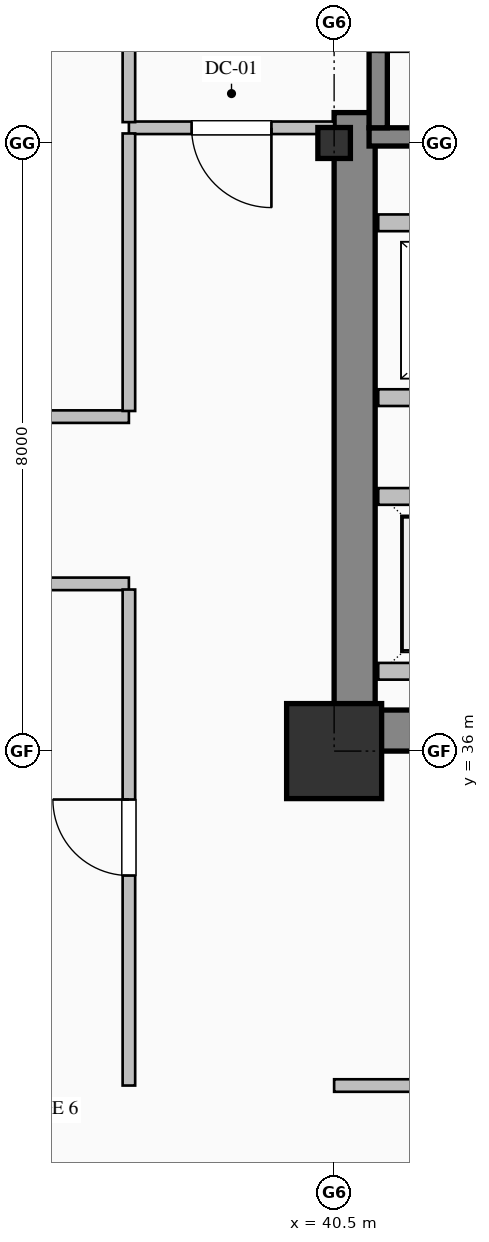
"""IFC4 building model, lengths in metres.
Left out: names, types, materials, properties, quantities, classifications, styles, units other than length and angle.
Written with IfcOpenShell. Run it as: python <this file> out.ifc"""

import sys

from ifc_helpers import new_model, si_unit, direction, frame, frame_2d, origin, origin_2d, place, context, subcontext, project, spatial, rectangle, hollow_rectangle, i_section, extrude, element, fill, save


model = new_model("IFC4")
c1 = context("Model", 3, precision=1e-05, world=origin(), true_north=direction((0.0, 1.0)))
c2 = subcontext(c1, "Body", "Model", "MODEL_VIEW")
j1 = project(units=[si_unit("LENGTHUNIT", "METRE"), si_unit("PLANEANGLEUNIT", "RADIAN")], contexts=[c1])
p1 = place(None, origin())
s1 = spatial("IfcSite", under=j1, at=p1, CompositionType="ELEMENT")
p2 = place(p1, origin())
s2 = spatial("IfcBuilding", under=s1, at=p2, CompositionType="ELEMENT")
p3 = place(p2, frame((0.0, 0.0, 96.2)))
s3 = spatial("IfcBuildingStorey", under=s2, at=p3, CompositionType="ELEMENT", Elevation=96.2)
p4 = place(p3, frame((40.77, 36.54, 0.0), z_axis=(0.0, 0.0, 1.0), x_axis=(0.0, 1.0, 0.0)))
e1 = element("IfcWall", 1, at=p4, inside=s3, PredefinedType="SHEAR", context=c2, shape_type="SweptSolid", body=[
    extrude(rectangle(XDim=7.86, YDim=0.54, at=frame_2d((3.93, 0.0))), origin(), (0.0, 0.0, 1.0), 3.75),
])
p5 = place(p3, frame((40.5, 36.27, 0.0), z_axis=(0.0, 0.0, 1.0), x_axis=(1.0, 0.0, 0.0)))
e2 = element("IfcWall", 2, at=p5, inside=s3, PredefinedType="SHEAR", context=c2, shape_type="SweptSolid", body=[
    extrude(rectangle(XDim=1.7, YDim=0.54, at=frame_2d((0.85, 0.0))), origin(), (0.0, 0.0, 1.0), 3.75),
])
p6 = place(p3, frame((40.5, 36.0, 0.0), z_axis=(0.0, 0.0, 1.0), x_axis=(1.0, 0.0, 0.0)))
e3 = element("IfcColumn", 3, at=p6, inside=s3, PredefinedType="COLUMN", context=c2, shape_type="SweptSolid", body=[
    extrude(hollow_rectangle(XDim=1.25, YDim=1.25, WallThickness=0.045, at=origin_2d()), origin(), (0.0, 0.0, 1.0), 4.0),
])
p7 = place(p3, frame((40.5, 44.0, 0.0), z_axis=(0.0, 0.0, 1.0), x_axis=(1.0, 0.0, 0.0)))
e4 = element("IfcColumn", 4, at=p7, inside=s3, PredefinedType="COLUMN", context=c2, shape_type="SweptSolid", body=[
    extrude(i_section(OverallWidth=0.407, OverallDepth=0.428, WebThickness=0.02, FlangeThickness=0.035, FilletRadius=0.022, at=origin_2d()), origin(), (0.0, 0.0, 1.0), 4.0),
])
p8 = place(p3, frame((49.04, 44.08, 0.0), z_axis=(0.0, 0.0, 1.0), x_axis=(-1.0, 0.0, 0.0)))
e5 = element("IfcWall", 5, at=p8, inside=s3, PredefinedType="SOLIDWALL", context=c2, shape_type="SweptSolid", body=[
    extrude(rectangle(XDim=8.08, YDim=0.24, at=frame_2d((4.04, 0.0))), origin(), (0.0, 0.0, 1.0), 4.0),
])
p9 = place(p3, frame((41.08, 47.35, 0.0), z_axis=(0.0, 0.0, 1.0), x_axis=(0.0, -1.0, 0.0)))
e6 = element("IfcWall", 6, at=p9, inside=s3, PredefinedType="SOLIDWALL", context=c2, shape_type="SweptSolid", body=[
    extrude(rectangle(XDim=3.15, YDim=0.24, at=frame_2d((1.575, 0.0))), origin(), (0.0, 0.0, 1.0), 4.0),
])
p10 = place(p9, frame((1.0, 0.0, 0.0)))
e7 = element("IfcOpeningElement", 7, at=p10, cuts=e6, PredefinedType="OPENING", context=c2, shape_type="SweptSolid", body=[
    extrude(rectangle(XDim=1.15, YDim=2.2, at=frame_2d((0.575, 1.1))), frame((0.0, 0.13, 0.0), z_axis=(0.0, -1.0, 0.0), x_axis=(1.0, 0.0, 0.0)), (0.0, 0.0, 1.0), 0.26),
])
p11 = place(p3, frame((49.32, 37.05, 0.0), z_axis=(0.0, 0.0, 1.0), x_axis=(-1.0, 0.0, 0.0)))
e8 = element("IfcWall", 8, at=p11, inside=s3, PredefinedType="PARTITIONING", context=c2, shape_type="SweptSolid", body=[
    extrude(rectangle(XDim=8.24, YDim=0.22, at=frame_2d((4.12, 0.0))), origin(), (0.0, 0.0, 1.0), 3.75),
])
p12 = place(p11, frame((6.37, 0.0, 0.0)))
e9 = element("IfcOpeningElement", 9, at=p12, cuts=e8, PredefinedType="OPENING", context=c2, shape_type="SweptSolid", body=[
    extrude(rectangle(XDim=1.1, YDim=2.2, at=frame_2d((0.55, 1.1))), frame((0.0, 0.12, 0.0), z_axis=(0.0, -1.0, 0.0), x_axis=(1.0, 0.0, 0.0)), (0.0, 0.0, 1.0), 0.24),
])
p13 = place(p11, frame((3.57, 0.0, 0.0)))
e10 = element("IfcOpeningElement", 10, at=p13, cuts=e8, PredefinedType="OPENING", context=c2, shape_type="SweptSolid", body=[
    extrude(rectangle(XDim=1.1, YDim=2.2, at=frame_2d((0.55, 1.1))), frame((0.0, 0.12, 0.0), z_axis=(0.0, -1.0, 0.0), x_axis=(1.0, 0.0, 0.0)), (0.0, 0.0, 1.0), 0.24),
])
p14 = place(p11, frame((0.77, 0.0, 0.0)))
e11 = element("IfcOpeningElement", 11, at=p14, cuts=e8, PredefinedType="OPENING", context=c2, shape_type="SweptSolid", body=[
    extrude(rectangle(XDim=1.1, YDim=2.2, at=frame_2d((0.55, 1.1))), frame((0.0, 0.12, 0.0), z_axis=(0.0, -1.0, 0.0), x_axis=(1.0, 0.0, 0.0)), (0.0, 0.0, 1.0), 0.24),
])
for number, where, z_axis, x_axis in (
    (12, (41.08, 39.35, 0.0), (0.0, 0.0, 1.0), (1.0, 0.0, 0.0)),
    (13, (49.32, 40.65, 0.0), (0.0, 0.0, 1.0), (-1.0, 0.0, 0.0)),
    (14, (41.08, 42.95, 0.0), (0.0, 0.0, 1.0), (1.0, 0.0, 0.0)),
):
    element("IfcWall", number, at=place(p3, frame(where, z_axis=z_axis, x_axis=x_axis)), inside=s3, PredefinedType="PARTITIONING", context=c2, shape_type="SweptSolid", body=[
        extrude(rectangle(XDim=8.24, YDim=0.22, at=frame_2d((4.12, 0.0))), origin(), (0.0, 0.0, 1.0), 3.75),
    ])
p15 = place(p3, frame((40.5, 44.2, 0.0), z_axis=(0.0, 0.0, 1.0), x_axis=(-1.0, 0.0, 0.0)))
e15 = element("IfcWall", 15, at=p15, inside=s3, PredefinedType="PARTITIONING", context=c2, shape_type="SweptSolid", body=[
    extrude(rectangle(XDim=2.7, YDim=0.165, at=frame_2d((1.35, 0.0))), origin(), (0.0, 0.0, 1.0), 3.75),
])
p16 = place(p15, frame((0.825, 0.0, 0.0)))
e16 = element("IfcOpeningElement", 16, at=p16, cuts=e15, PredefinedType="OPENING", context=c2, shape_type="SweptSolid", body=[
    extrude(rectangle(XDim=1.05, YDim=2.15, at=frame_2d((0.525, 1.075))), frame((0.0, 0.093, 0.0), z_axis=(0.0, -1.0, 0.0), x_axis=(1.0, 0.0, 0.0)), (0.0, 0.0, 1.0), 0.185),
])
p17 = place(p3, frame((37.8, 44.274, 0.0), z_axis=(0.0, 0.0, 1.0), x_axis=(0.0, 1.0, 0.0)))
e17 = element("IfcWall", 17, at=p17, inside=s3, PredefinedType="PARTITIONING", context=c2, shape_type="SweptSolid", body=[
    extrude(rectangle(XDim=3.051, YDim=0.165, at=frame_2d((1.525, 0.0))), origin(), (0.0, 0.0, 1.0), 3.75),
])
p18 = place(p3, frame((31.0, 40.4, 0.0), z_axis=(0.0, 0.0, 1.0), x_axis=(1.0, 0.0, 0.0)))
e18 = element("IfcWall", 18, at=p18, inside=s3, PredefinedType="PARTITIONING", context=c2, shape_type="SweptSolid", body=[
    extrude(rectangle(XDim=6.8, YDim=0.165, at=frame_2d((3.4, 0.0))), origin(), (0.0, 0.0, 1.0), 3.75),
])
p19 = place(p18, frame((2.9, 0.0, 0.0)))
e19 = element("IfcOpeningElement", 19, at=p19, cuts=e18, PredefinedType="OPENING", context=c2, shape_type="SweptSolid", body=[
    extrude(rectangle(XDim=1.0, YDim=2.15, at=frame_2d((0.5, 1.075))), frame((0.0, 0.093, 0.0), z_axis=(0.0, -1.0, 0.0), x_axis=(1.0, 0.0, 0.0)), (0.0, 0.0, 1.0), 0.185),
])
p20 = place(p3, frame((37.8, 38.2, 0.0), z_axis=(0.0, 0.0, 1.0), x_axis=(-1.0, 0.0, 0.0)))
e20 = element("IfcWall", 20, at=p20, inside=s3, PredefinedType="PARTITIONING", context=c2, shape_type="SweptSolid", body=[
    extrude(rectangle(XDim=4.0, YDim=0.165, at=frame_2d((2.0, 0.0))), origin(), (0.0, 0.0, 1.0), 3.75),
])
p21 = place(p3, frame((37.8, 40.475, 0.0), z_axis=(0.0, 0.0, 1.0), x_axis=(0.0, 1.0, 0.0)))
e21 = element("IfcWall", 21, at=p21, inside=s3, PredefinedType="PARTITIONING", context=c2, shape_type="SweptSolid", body=[
    extrude(rectangle(XDim=3.651, YDim=0.165, at=frame_2d((1.825, 0.0))), origin(), (0.0, 0.0, 1.0), 3.75),
])
p22 = place(p3, frame((37.8, 31.6, 0.0), z_axis=(0.0, 0.0, 1.0), x_axis=(0.0, 1.0, 0.0)))
e22 = element("IfcWall", 22, at=p22, inside=s3, PredefinedType="PARTITIONING", context=c2, shape_type="SweptSolid", body=[
    extrude(rectangle(XDim=6.525, YDim=0.165, at=frame_2d((3.263, 0.0))), origin(), (0.0, 0.0, 1.0), 3.75),
])
p23 = place(p22, frame((2.763, 0.0, 0.0)))
e23 = element("IfcOpeningElement", 23, at=p23, cuts=e22, PredefinedType="OPENING", context=c2, shape_type="SweptSolid", body=[
    extrude(rectangle(XDim=1.0, YDim=2.15, at=frame_2d((0.5, 1.075))), frame((0.0, 0.093, 0.0), z_axis=(0.0, -1.0, 0.0), x_axis=(1.0, 0.0, 0.0)), (0.0, 0.0, 1.0), 0.185),
])
p24 = place(p3, frame((43.0, 31.6, 0.0), z_axis=(0.0, 0.0, 1.0), x_axis=(-1.0, 0.0, 0.0)))
e24 = element("IfcWall", 24, at=p24, inside=s3, PredefinedType="PARTITIONING", context=c2, shape_type="SweptSolid", body=[
    extrude(rectangle(XDim=2.5, YDim=0.165, at=frame_2d((1.25, 0.0))), origin(), (0.0, 0.0, 1.0), 3.75),
])
p25 = place(p16, origin())
e25 = element("IfcDoor", 25, at=p25, inside=s3, OperationType="SINGLE_SWING_LEFT", PredefinedType="DOOR", context=c2, shape_type="SweptSolid", body=[
    extrude(rectangle(XDim=1.05, YDim=2.15, at=frame_2d((0.525, 1.075))), frame((0.0, 0.025, 0.0), z_axis=(0.0, -1.0, 0.0), x_axis=(1.0, 0.0, 0.0)), (0.0, 0.0, 1.0), 0.05),
])
fill(e16, e25)
p26 = place(p23, origin())
e26 = element("IfcDoor", 26, at=p26, inside=s3, OperationType="SINGLE_SWING_RIGHT", PredefinedType="DOOR", context=c2, shape_type="SweptSolid", body=[
    extrude(rectangle(XDim=1.0, YDim=2.15, at=frame_2d((0.5, 1.075))), frame((0.0, 0.025, 0.0), z_axis=(0.0, -1.0, 0.0), x_axis=(1.0, 0.0, 0.0)), (0.0, 0.0, 1.0), 0.05),
])
fill(e23, e26)
save(model, sys.argv[1])
